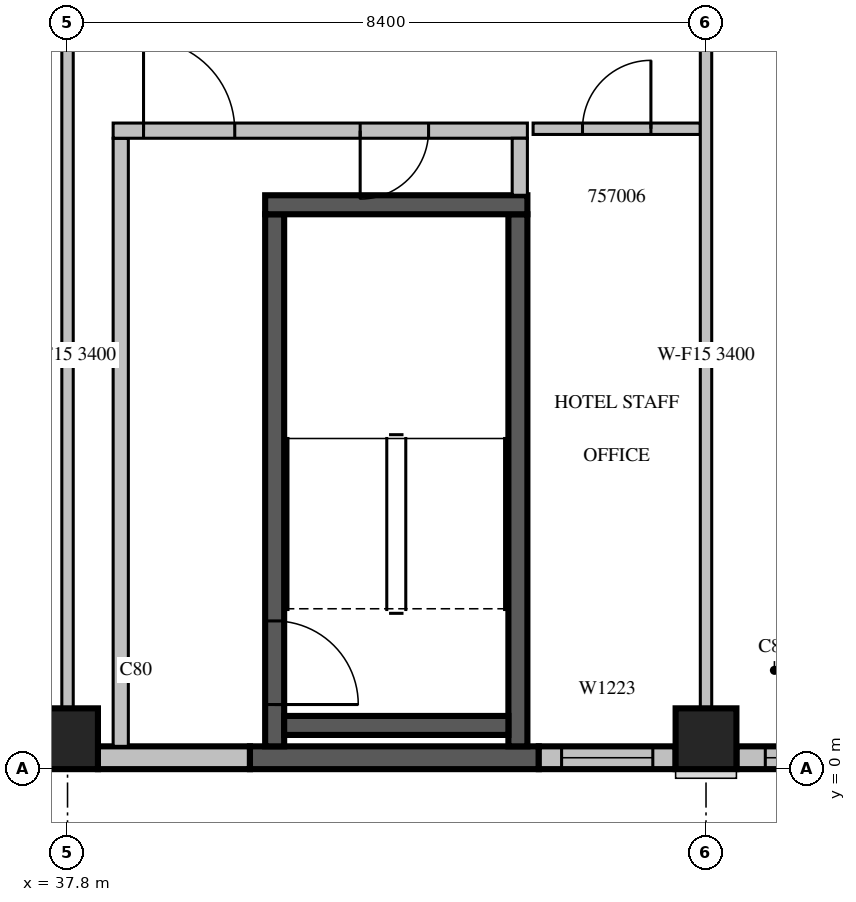
"""IFC4 building model, lengths in metres.
Left out: names, types, materials, properties, quantities, classifications, styles, units other than length and angle.
Written with IfcOpenShell. Run it as: python <this file> out.ifc"""

import sys

from ifc_helpers import new_model, si_unit, direction, frame, frame_2d, origin, origin_2d, place, context, subcontext, project, spatial, rectangle, extrude, source, transform, mapped, element, fill, save


model = new_model("IFC4")
c1 = context("Model", 3, precision=1e-05, world=origin(), true_north=direction((0.0, 1.0)))
c2 = subcontext(c1, "Body", "Model", "MODEL_VIEW")
j1 = project(units=[si_unit("LENGTHUNIT", "METRE"), si_unit("PLANEANGLEUNIT", "RADIAN")], contexts=[c1])
p1 = place(None, origin())
s1 = spatial("IfcSite", under=j1, at=p1, CompositionType="ELEMENT")
p2 = place(p1, origin())
s2 = spatial("IfcBuilding", under=s1, at=p2, CompositionType="ELEMENT")
p3 = place(p2, frame((0.0, 0.0, 250.0)))
s3 = spatial("IfcBuildingStorey", under=s2, at=p3, CompositionType="ELEMENT", Elevation=250.0)
m1 = source(origin(), c2, "Body", "SweptSolid", [
    extrude(rectangle(XDim=0.8, YDim=0.8, at=origin_2d()), origin(), (0.0, 0.0, 1.0), 3.8),
])
for number, where, z_axis, x_axis in (
    (1, (37.8, 0.4, 0.0), (0.0, 0.0, 1.0), (1.0, 0.0, 0.0)),
    (2, (46.2, 0.4, 0.0), (0.0, 0.0, 1.0), (1.0, 0.0, 0.0)),
):
    element("IfcColumn", number, at=place(p3, frame(where, z_axis=z_axis, x_axis=x_axis)), inside=s3, PredefinedType="COLUMN", context=c2, shape_type="MappedRepresentation", body=[
        mapped(m1, transform((0.0, 0.0, 0.0), scale=1.0)),
    ])
m2 = source(origin(), c2, "Body", "SweptSolid", [
    extrude(rectangle(XDim=2.0, YDim=0.3, at=frame_2d((1.0, 0.0))), origin(), (0.0, 0.0, 1.0), 3.4),
])
p4 = place(p3, frame((38.2, 0.15, 0.0), z_axis=(0.0, 0.0, 1.0), x_axis=(1.0, 0.0, 0.0)))
e3 = element("IfcWall", 3, at=p4, inside=s3, PredefinedType="STANDARD", context=c2, shape_type="MappedRepresentation", body=[
    mapped(m2, transform((0.0, 0.0, 0.0), scale=1.0)),
])
m3 = source(origin(), c2, "Body", "SweptSolid", [
    extrude(rectangle(XDim=3.8, YDim=0.3, at=frame_2d((1.9, 0.0))), origin(), (0.0, 0.0, 1.0), 3.4),
])
p5 = place(p3, frame((40.2, 0.15, 0.0), z_axis=(0.0, 0.0, 1.0), x_axis=(1.0, 0.0, 0.0)))
e4 = element("IfcWall", 4, at=p5, inside=s3, PredefinedType="SOLIDWALL", context=c2, shape_type="MappedRepresentation", body=[
    mapped(m3, transform((0.0, 0.0, 0.0), scale=1.0)),
])
m4 = source(origin(), c2, "Body", "SweptSolid", [
    extrude(rectangle(XDim=1.8, YDim=0.3, at=frame_2d((0.9, 0.0))), origin(), (0.0, 0.0, 1.0), 3.4),
])
p6 = place(p3, frame((44.0, 0.15, 0.0), z_axis=(0.0, 0.0, 1.0), x_axis=(1.0, 0.0, 0.0)))
e5 = element("IfcWall", 5, at=p6, inside=s3, PredefinedType="STANDARD", context=c2, shape_type="MappedRepresentation", body=[
    mapped(m4, transform((0.0, 0.0, 0.0), scale=1.0)),
])
m5 = source(origin(), c2, "Body", "SweptSolid", [
    extrude(rectangle(XDim=1.2, YDim=2.3, at=frame_2d((0.6, 1.15))), frame((0.0, 0.16, 0.0), z_axis=(0.0, -1.0, 0.0), x_axis=(1.0, 0.0, 0.0)), (0.0, 0.0, 1.0), 0.32),
])
p7 = place(p6, frame((0.3, 0.0, 0.6)))
e6 = element("IfcOpeningElement", 6, at=p7, cuts=e5, PredefinedType="OPENING", context=c2, shape_type="MappedRepresentation", body=[
    mapped(m5, transform((0.0, 0.0, 0.0), scale=1.0)),
])
m6 = source(origin(), c2, "Body", "SweptSolid", [
    extrude(rectangle(XDim=2.96, YDim=0.3, at=frame_2d((1.48, 0.0))), origin(), (0.0, 0.0, 1.0), 3.4),
])
p8 = place(p3, frame((46.6, 0.15, 0.0), z_axis=(0.0, 0.0, 1.0), x_axis=(1.0, 0.0, 0.0)))
e7 = element("IfcWall", 7, at=p8, inside=s3, PredefinedType="STANDARD", context=c2, shape_type="MappedRepresentation", body=[
    mapped(m6, transform((0.0, 0.0, 0.0), scale=1.0)),
])
m7 = source(origin(), c2, "Body", "SweptSolid", [
    extrude(rectangle(XDim=1.8, YDim=2.3, at=frame_2d((0.9, 1.15))), frame((0.0, 0.16, 0.0), z_axis=(0.0, -1.0, 0.0), x_axis=(1.0, 0.0, 0.0)), (0.0, 0.0, 1.0), 0.32),
])
p9 = place(p8, frame((0.38, 0.0, 0.6)))
e8 = element("IfcOpeningElement", 8, at=p9, cuts=e7, PredefinedType="OPENING", context=c2, shape_type="MappedRepresentation", body=[
    mapped(m7, transform((0.0, 0.0, 0.0), scale=1.0)),
])
m8 = source(origin(), c2, "Body", "SweptSolid", [
    extrude(rectangle(XDim=7.0, YDim=0.25, at=frame_2d((3.5, 0.0))), origin(), (0.0, 0.0, 1.0), 3.4),
])
p10 = place(p3, frame((40.525, 0.3, 0.0), z_axis=(0.0, 0.0, 1.0), x_axis=(0.0, 1.0, 0.0)))
e9 = element("IfcWall", 9, at=p10, inside=s3, PredefinedType="SOLIDWALL", context=c2, shape_type="MappedRepresentation", body=[
    mapped(m8, transform((0.0, 0.0, 0.0), scale=1.0)),
])
m9 = source(origin(), c2, "Body", "SweptSolid", [
    extrude(rectangle(XDim=1.1, YDim=2.1, at=frame_2d((0.55, 1.05))), frame((0.0, 0.135, 0.0), z_axis=(0.0, -1.0, 0.0), x_axis=(1.0, 0.0, 0.0)), (0.0, 0.0, 1.0), 0.27),
])
p11 = place(p10, frame((0.55, 0.0, 0.0)))
e10 = element("IfcOpeningElement", 10, at=p11, cuts=e9, PredefinedType="OPENING", context=c2, shape_type="MappedRepresentation", body=[
    mapped(m9, transform((0.0, 0.0, 0.0), scale=1.0)),
])
p12 = place(p3, frame((43.725, 0.3, 0.0), z_axis=(0.0, 0.0, 1.0), x_axis=(0.0, 1.0, 0.0)))
e11 = element("IfcWall", 11, at=p12, inside=s3, PredefinedType="SOLIDWALL", context=c2, shape_type="MappedRepresentation", body=[
    mapped(m8, transform((0.0, 0.0, 0.0), scale=1.0)),
])
m10 = source(origin(), c2, "Body", "SweptSolid", [
    extrude(rectangle(XDim=3.45, YDim=0.25, at=frame_2d((1.725, 0.0))), origin(), (0.0, 0.0, 1.0), 3.4),
])
p13 = place(p3, frame((40.4, 7.425, 0.0), z_axis=(0.0, 0.0, 1.0), x_axis=(1.0, 0.0, 0.0)))
e12 = element("IfcWall", 12, at=p13, inside=s3, PredefinedType="SOLIDWALL", context=c2, shape_type="MappedRepresentation", body=[
    mapped(m10, transform((0.0, 0.0, 0.0), scale=1.0)),
])
m11 = source(origin(), c2, "Body", "SweptSolid", [
    extrude(rectangle(XDim=2.95, YDim=0.25, at=frame_2d((1.475, 0.0))), origin(), (0.0, 0.0, 1.0), 3.4),
])
p14 = place(p3, frame((40.65, 0.575, 0.0), z_axis=(0.0, 0.0, 1.0), x_axis=(1.0, 0.0, 0.0)))
e13 = element("IfcWall", 13, at=p14, inside=s3, PredefinedType="SOLIDWALL", context=c2, shape_type="MappedRepresentation", body=[
    mapped(m11, transform((0.0, 0.0, 0.0), scale=1.0)),
])
m12 = source(origin(), c2, "Body", "SweptSolid", [
    extrude(rectangle(XDim=8.0, YDim=0.2, at=frame_2d((4.0, 0.0))), origin(), (0.0, 0.0, 1.0), 3.4),
])
p15 = place(p3, frame((38.5, 0.3, 0.0), z_axis=(0.0, 0.0, 1.0), x_axis=(0.0, 1.0, 0.0)))
e14 = element("IfcWall", 14, at=p15, inside=s3, PredefinedType="PARTITIONING", context=c2, shape_type="MappedRepresentation", body=[
    mapped(m12, transform((0.0, 0.0, 0.0), scale=1.0)),
])
m13 = source(origin(), c2, "Body", "SweptSolid", [
    extrude(rectangle(XDim=5.45, YDim=0.2, at=frame_2d((2.725, 0.0))), origin(), (0.0, 0.0, 1.0), 3.4),
])
p16 = place(p3, frame((38.4, 8.4, 0.0), z_axis=(0.0, 0.0, 1.0), x_axis=(1.0, 0.0, 0.0)))
e15 = element("IfcWall", 15, at=p16, inside=s3, PredefinedType="PARTITIONING", context=c2, shape_type="MappedRepresentation", body=[
    mapped(m13, transform((0.0, 0.0, 0.0), scale=1.0)),
])
m14 = source(origin(), c2, "Body", "SweptSolid", [
    extrude(rectangle(XDim=1.2, YDim=2.1, at=frame_2d((0.6, 1.05))), frame((0.0, 0.11, 0.0), z_axis=(0.0, -1.0, 0.0), x_axis=(1.0, 0.0, 0.0)), (0.0, 0.0, 1.0), 0.22),
])
p17 = place(p16, frame((0.4, 0.0, 0.0)))
e16 = element("IfcOpeningElement", 16, at=p17, cuts=e15, PredefinedType="OPENING", context=c2, shape_type="MappedRepresentation", body=[
    mapped(m14, transform((0.0, 0.0, 0.0), scale=1.0)),
])
m15 = source(origin(), c2, "Body", "SweptSolid", [
    extrude(rectangle(XDim=0.9, YDim=2.1, at=frame_2d((0.45, 1.05))), frame((0.0, 0.11, 0.0), z_axis=(0.0, -1.0, 0.0), x_axis=(1.0, 0.0, 0.0)), (0.0, 0.0, 1.0), 0.22),
])
p18 = place(p16, frame((3.25, 0.0, 0.0)))
e17 = element("IfcOpeningElement", 17, at=p18, cuts=e15, PredefinedType="OPENING", context=c2, shape_type="MappedRepresentation", body=[
    mapped(m15, transform((0.0, 0.0, 0.0), scale=1.0)),
])
m16 = source(origin(), c2, "Body", "SweptSolid", [
    extrude(rectangle(XDim=0.75, YDim=0.2, at=frame_2d((0.375, 0.0))), origin(), (0.0, 0.0, 1.0), 3.4),
])
p19 = place(p3, frame((43.75, 7.55, 0.0), z_axis=(0.0, 0.0, 1.0), x_axis=(0.0, 1.0, 0.0)))
e18 = element("IfcWall", 18, at=p19, inside=s3, PredefinedType="PARTITIONING", context=c2, shape_type="MappedRepresentation", body=[
    mapped(m16, transform((0.0, 0.0, 0.0), scale=1.0)),
])
m17 = source(origin(), c2, "Body", "SweptSolid", [
    extrude(rectangle(XDim=2.2, YDim=0.15, at=frame_2d((1.1, 0.0))), origin(), (0.0, 0.0, 1.0), 3.4),
])
p20 = place(p3, frame((46.125, 8.425, 0.0), z_axis=(0.0, 0.0, 1.0), x_axis=(-1.0, 0.0, 0.0)))
e19 = element("IfcWall", 19, at=p20, inside=s3, PredefinedType="PARTITIONING", context=c2, shape_type="MappedRepresentation", body=[
    mapped(m17, transform((0.0, 0.0, 0.0), scale=1.0)),
])
m18 = source(origin(), c2, "Body", "SweptSolid", [
    extrude(rectangle(XDim=0.9, YDim=2.1, at=frame_2d((0.45, 1.05))), frame((0.0, 0.085, 0.0), z_axis=(0.0, -1.0, 0.0), x_axis=(1.0, 0.0, 0.0)), (0.0, 0.0, 1.0), 0.17),
])
p21 = place(p20, frame((0.65, 0.0, 0.0)))
e20 = element("IfcOpeningElement", 20, at=p21, cuts=e19, PredefinedType="OPENING", context=c2, shape_type="MappedRepresentation", body=[
    mapped(m18, transform((0.0, 0.0, 0.0), scale=1.0)),
])
m19 = source(origin(), c2, "Body", "SweptSolid", [
    extrude(rectangle(XDim=9.302, YDim=0.15, at=frame_2d((4.651, 0.0))), origin(), (0.0, 0.0, 1.0), 3.4),
])
for number, where, z_axis, x_axis in (
    (21, (37.8, 0.799, 0.0), (0.0, 0.0, 1.0), (0.0, 1.0, 0.0)),
    (22, (46.2, 0.799, 0.0), (0.0, 0.0, 1.0), (0.0, 1.0, 0.0)),
):
    element("IfcWall", number, at=place(p3, frame(where, z_axis=z_axis, x_axis=x_axis)), inside=s3, PredefinedType="PARTITIONING", context=c2, shape_type="MappedRepresentation", body=[
        mapped(m19, transform((0.0, 0.0, 0.0), scale=1.0)),
    ])
m20 = source(origin(), c2, "Body", "SweptSolid", [
    extrude(rectangle(XDim=1.2, YDim=2.3, at=frame_2d((0.6, 1.15))), frame((0.0, 0.03, 0.0), z_axis=(0.0, -1.0, 0.0), x_axis=(1.0, 0.0, 0.0)), (0.0, 0.0, 1.0), 0.06),
])
p22 = place(p7, origin())
e23 = element("IfcWindow", 23, at=p22, inside=s3, PartitioningType="SINGLE_PANEL", PredefinedType="WINDOW", context=c2, shape_type="MappedRepresentation", body=[
    mapped(m20, transform((0.0, 0.0, 0.0), scale=1.0)),
])
fill(e6, e23)
m21 = source(origin(), c2, "Body", "SweptSolid", [
    extrude(rectangle(XDim=1.8, YDim=2.3, at=frame_2d((0.9, 1.15))), frame((0.0, 0.03, 0.0), z_axis=(0.0, -1.0, 0.0), x_axis=(1.0, 0.0, 0.0)), (0.0, 0.0, 1.0), 0.06),
])
p23 = place(p9, origin())
e24 = element("IfcWindow", 24, at=p23, inside=s3, PartitioningType="SINGLE_PANEL", PredefinedType="WINDOW", context=c2, shape_type="MappedRepresentation", body=[
    mapped(m21, transform((0.0, 0.0, 0.0), scale=1.0)),
])
fill(e8, e24)
m22 = source(origin(), c2, "Body", "SweptSolid", [
    extrude(rectangle(XDim=1.1, YDim=2.1, at=frame_2d((0.55, 1.05))), frame((0.0, 0.025, 0.0), z_axis=(0.0, -1.0, 0.0), x_axis=(1.0, 0.0, 0.0)), (0.0, 0.0, 1.0), 0.05),
])
p24 = place(p11, origin())
e25 = element("IfcDoor", 25, at=p24, inside=s3, OperationType="SINGLE_SWING_RIGHT", PredefinedType="DOOR", context=c2, shape_type="MappedRepresentation", body=[
    mapped(m22, transform((0.0, 0.0, 0.0), scale=1.0)),
])
fill(e10, e25)
m23 = source(origin(), c2, "Body", "SweptSolid", [
    extrude(rectangle(XDim=1.2, YDim=2.1, at=frame_2d((0.6, 1.05))), frame((0.0, 0.025, 0.0), z_axis=(0.0, -1.0, 0.0), x_axis=(1.0, 0.0, 0.0)), (0.0, 0.0, 1.0), 0.05),
])
p25 = place(p17, origin())
e26 = element("IfcDoor", 26, at=p25, inside=s3, OperationType="SINGLE_SWING_LEFT", PredefinedType="DOOR", context=c2, shape_type="MappedRepresentation", body=[
    mapped(m23, transform((0.0, 0.0, 0.0), scale=1.0)),
])
fill(e16, e26)
m24 = source(origin(), c2, "Body", "SweptSolid", [
    extrude(rectangle(XDim=0.9, YDim=2.1, at=frame_2d((0.45, 1.05))), frame((0.0, 0.025, 0.0), z_axis=(0.0, -1.0, 0.0), x_axis=(1.0, 0.0, 0.0)), (0.0, 0.0, 1.0), 0.05),
])
p26 = place(p18, origin())
e27 = element("IfcDoor", 27, at=p26, inside=s3, OperationType="SINGLE_SWING_RIGHT", PredefinedType="DOOR", context=c2, shape_type="MappedRepresentation", body=[
    mapped(m24, transform((0.0, 0.0, 0.0), scale=1.0)),
])
fill(e17, e27)
p27 = place(p21, origin())
e28 = element("IfcDoor", 28, at=p27, inside=s3, OperationType="SINGLE_SWING_RIGHT", PredefinedType="DOOR", context=c2, shape_type="MappedRepresentation", body=[
    mapped(m24, transform((0.0, 0.0, 0.0), scale=1.0)),
])
fill(e20, e28)
save(model, sys.argv[1])
